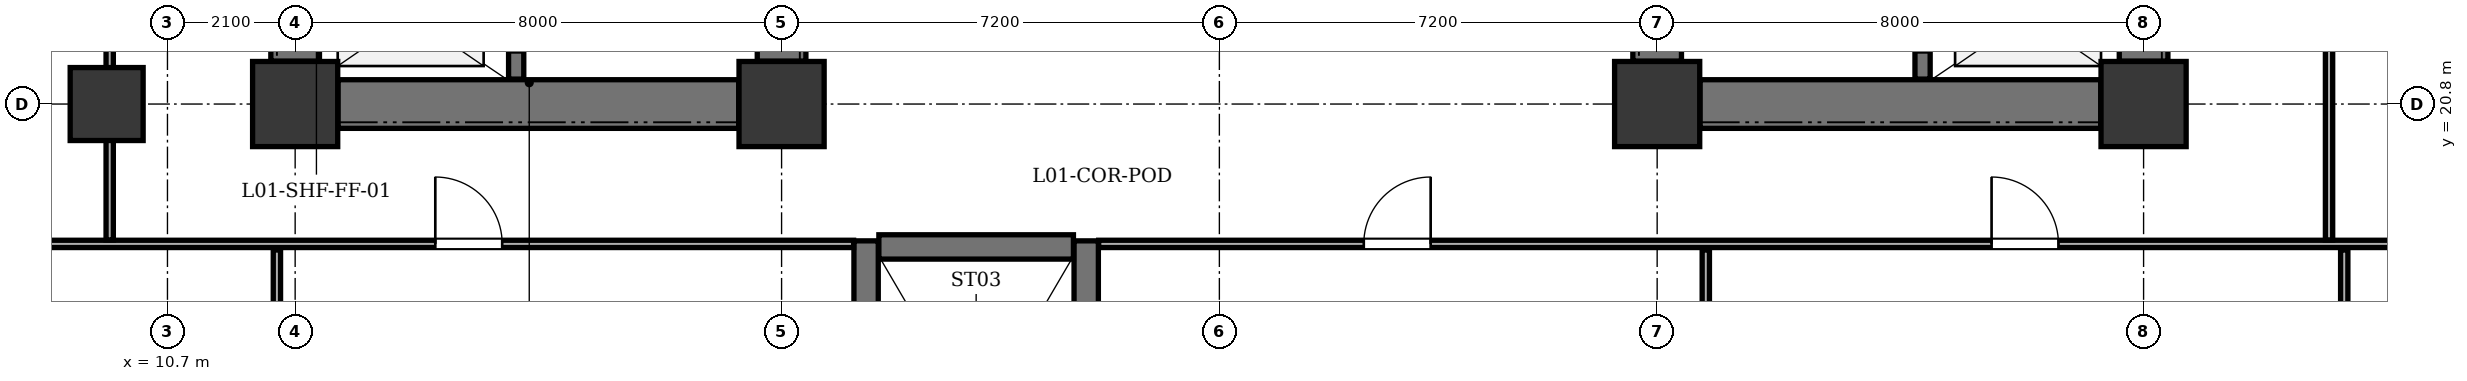
"""IFC4 building model, lengths in metres.
Left out: names, types, materials, properties, quantities, classifications, styles, units other than length and angle.
Written with IfcOpenShell. Run it as: python <this file> out.ifc"""

import sys

from ifc_helpers import new_model, si_unit, direction, frame, frame_2d, origin, origin_2d, place, context, subcontext, project, spatial, rectangle, extrude, element, fill, save


model = new_model("IFC4")
c1 = context("Model", 3, precision=1e-05, world=origin(), true_north=direction((0.0, 1.0)))
c2 = subcontext(c1, "Body", "Model", "MODEL_VIEW")
j1 = project(units=[si_unit("LENGTHUNIT", "METRE"), si_unit("PLANEANGLEUNIT", "RADIAN")], contexts=[c1])
p1 = place(None, origin())
s1 = spatial("IfcSite", under=j1, at=p1, CompositionType="ELEMENT")
p2 = place(p1, origin())
s2 = spatial("IfcBuilding", under=s1, at=p2, CompositionType="ELEMENT")
p3 = place(p2, frame((0.0, 0.0, 5.4)))
s3 = spatial("IfcBuildingStorey", under=s2, at=p3, CompositionType="ELEMENT", Elevation=5.4)
for number, where, z_axis, x_axis in (
    (1, (12.8, 20.8, 0.0), (0.0, 0.0, 1.0), (1.0, 0.0, 0.0)),
    (2, (20.8, 20.8, 0.0), (0.0, 0.0, 1.0), (1.0, 0.0, 0.0)),
    (3, (35.2, 20.8, 0.0), (0.0, 0.0, 1.0), (1.0, 0.0, 0.0)),
    (4, (43.2, 20.8, 0.0), (0.0, 0.0, 1.0), (1.0, 0.0, 0.0)),
):
    element("IfcColumn", number, at=place(p3, frame(where, z_axis=z_axis, x_axis=x_axis)), inside=s3, PredefinedType="COLUMN", context=c2, shape_type="SweptSolid", body=[
        extrude(rectangle(XDim=1.4, YDim=1.4, at=origin_2d()), origin(), (0.0, 0.0, 1.0), 4.5),
    ])
p4 = place(p3, frame((9.7, 20.8, 0.0), z_axis=(0.0, 0.0, 1.0), x_axis=(1.0, 0.0, 0.0)))
e5 = element("IfcColumn", 5, at=p4, inside=s3, PredefinedType="COLUMN", context=c2, shape_type="SweptSolid", body=[
    extrude(rectangle(XDim=1.2, YDim=1.2, at=origin_2d()), origin(), (0.0, 0.0, 1.0), 4.5),
])
p5 = place(p3, frame((12.8, 21.505, 0.0), z_axis=(0.0, 0.0, 1.0), x_axis=(0.0, 1.0, 0.0)))
e6 = element("IfcWall", 6, at=p5, inside=s3, PredefinedType="SHEAR", context=c2, shape_type="SweptSolid", body=[
    extrude(rectangle(XDim=11.39, YDim=0.8, at=frame_2d((5.695, 0.0))), origin(), (0.0, 0.0, 1.0), 4.18),
])
p6 = place(p3, frame((13.505, 20.8, 0.0), z_axis=(0.0, 0.0, 1.0), x_axis=(1.0, 0.0, 0.0)))
e7 = element("IfcWall", 7, at=p6, inside=s3, PredefinedType="SHEAR", context=c2, shape_type="SweptSolid", body=[
    extrude(rectangle(XDim=6.59, YDim=0.8, at=frame_2d((3.295, 0.0))), origin(), (0.0, 0.0, 1.0), 4.18),
])
p7 = place(p3, frame((20.8, 21.505, 0.0), z_axis=(0.0, 0.0, 1.0), x_axis=(0.0, 1.0, 0.0)))
e8 = element("IfcWall", 8, at=p7, inside=s3, PredefinedType="SHEAR", context=c2, shape_type="SweptSolid", body=[
    extrude(rectangle(XDim=11.39, YDim=0.8, at=frame_2d((5.695, 0.0))), origin(), (0.0, 0.0, 1.0), 4.18),
])
p8 = place(p7, frame((1.095, 0.0, 0.0)))
e9 = element("IfcOpeningElement", 9, at=p8, cuts=e8, PredefinedType="OPENING", context=c2, shape_type="SweptSolid", body=[
    extrude(rectangle(XDim=1.2, YDim=2.15, at=frame_2d((0.6, 1.075))), frame((0.0, 0.41, 0.0), z_axis=(0.0, -1.0, 0.0), x_axis=(1.0, 0.0, 0.0)), (0.0, 0.0, 1.0), 0.82),
])
p9 = place(p7, frame((4.095, 0.0, 0.0)))
e10 = element("IfcOpeningElement", 10, at=p9, cuts=e8, PredefinedType="OPENING", context=c2, shape_type="SweptSolid", body=[
    extrude(rectangle(XDim=1.1, YDim=2.1, at=frame_2d((0.55, 1.05))), frame((0.0, 0.41, 0.0), z_axis=(0.0, -1.0, 0.0), x_axis=(1.0, 0.0, 0.0)), (0.0, 0.0, 1.0), 0.82),
])
p10 = place(p7, frame((6.045, 0.0, 0.0)))
e11 = element("IfcOpeningElement", 11, at=p10, cuts=e8, PredefinedType="OPENING", context=c2, shape_type="SweptSolid", body=[
    extrude(rectangle(XDim=1.1, YDim=2.1, at=frame_2d((0.55, 1.05))), frame((0.0, 0.41, 0.0), z_axis=(0.0, -1.0, 0.0), x_axis=(1.0, 0.0, 0.0)), (0.0, 0.0, 1.0), 0.82),
])
p11 = place(p7, frame((7.995, 0.0, 0.0)))
e12 = element("IfcOpeningElement", 12, at=p11, cuts=e8, PredefinedType="OPENING", context=c2, shape_type="SweptSolid", body=[
    extrude(rectangle(XDim=1.1, YDim=2.1, at=frame_2d((0.55, 1.05))), frame((0.0, 0.41, 0.0), z_axis=(0.0, -1.0, 0.0), x_axis=(1.0, 0.0, 0.0)), (0.0, 0.0, 1.0), 0.82),
])
p12 = place(p7, frame((10.195, 0.0, 0.0)))
e13 = element("IfcOpeningElement", 13, at=p12, cuts=e8, PredefinedType="OPENING", context=c2, shape_type="SweptSolid", body=[
    extrude(rectangle(XDim=1.1, YDim=2.1, at=frame_2d((0.55, 1.05))), frame((0.0, 0.41, 0.0), z_axis=(0.0, -1.0, 0.0), x_axis=(1.0, 0.0, 0.0)), (0.0, 0.0, 1.0), 0.82),
])
p13 = place(p3, frame((16.435, 21.21, 0.0), z_axis=(0.0, 0.0, 1.0), x_axis=(0.0, 1.0, 0.0)))
e14 = element("IfcWall", 14, at=p13, inside=s3, PredefinedType="SHEAR", context=c2, shape_type="SweptSolid", body=[
    extrude(rectangle(XDim=11.98, YDim=0.25, at=frame_2d((5.99, 0.0))), origin(), (0.0, 0.0, 1.0), 4.18),
])
p14 = place(p13, frame((0.44, 0.0, 0.0)))
e15 = element("IfcOpeningElement", 15, at=p14, cuts=e14, PredefinedType="OPENING", context=c2, shape_type="SweptSolid", body=[
    extrude(rectangle(XDim=1.2, YDim=2.15, at=frame_2d((0.6, 1.075))), frame((0.0, 0.135, 0.0), z_axis=(0.0, -1.0, 0.0), x_axis=(1.0, 0.0, 0.0)), (0.0, 0.0, 1.0), 0.27),
])
p15 = place(p13, frame((2.59, 0.0, 0.0)))
e16 = element("IfcOpeningElement", 16, at=p15, cuts=e14, PredefinedType="OPENING", context=c2, shape_type="SweptSolid", body=[
    extrude(rectangle(XDim=1.15, YDim=2.15, at=frame_2d((0.575, 1.075))), frame((0.0, 0.135, 0.0), z_axis=(0.0, -1.0, 0.0), x_axis=(1.0, 0.0, 0.0)), (0.0, 0.0, 1.0), 0.27),
])
p16 = place(p3, frame((43.2, 21.505, 0.0), z_axis=(0.0, 0.0, 1.0), x_axis=(0.0, 1.0, 0.0)))
e17 = element("IfcWall", 17, at=p16, inside=s3, PredefinedType="SHEAR", context=c2, shape_type="SweptSolid", body=[
    extrude(rectangle(XDim=11.39, YDim=0.8, at=frame_2d((5.695, 0.0))), origin(), (0.0, 0.0, 1.0), 4.18),
])
p17 = place(p3, frame((35.905, 20.8, 0.0), z_axis=(0.0, 0.0, 1.0), x_axis=(1.0, 0.0, 0.0)))
e18 = element("IfcWall", 18, at=p17, inside=s3, PredefinedType="SHEAR", context=c2, shape_type="SweptSolid", body=[
    extrude(rectangle(XDim=6.59, YDim=0.8, at=frame_2d((3.295, 0.0))), origin(), (0.0, 0.0, 1.0), 4.18),
])
p18 = place(p3, frame((35.2, 21.505, 0.0), z_axis=(0.0, 0.0, 1.0), x_axis=(0.0, 1.0, 0.0)))
e19 = element("IfcWall", 19, at=p18, inside=s3, PredefinedType="SHEAR", context=c2, shape_type="SweptSolid", body=[
    extrude(rectangle(XDim=11.39, YDim=0.8, at=frame_2d((5.695, 0.0))), origin(), (0.0, 0.0, 1.0), 4.18),
])
p19 = place(p18, frame((1.095, 0.0, 0.0)))
e20 = element("IfcOpeningElement", 20, at=p19, cuts=e19, PredefinedType="OPENING", context=c2, shape_type="SweptSolid", body=[
    extrude(rectangle(XDim=1.2, YDim=2.15, at=frame_2d((0.6, 1.075))), frame((0.0, 0.41, 0.0), z_axis=(0.0, -1.0, 0.0), x_axis=(1.0, 0.0, 0.0)), (0.0, 0.0, 1.0), 0.82),
])
p20 = place(p18, frame((10.195, 0.0, 0.0)))
e21 = element("IfcOpeningElement", 21, at=p20, cuts=e19, PredefinedType="OPENING", context=c2, shape_type="SweptSolid", body=[
    extrude(rectangle(XDim=1.1, YDim=2.1, at=frame_2d((0.55, 1.05))), frame((0.0, 0.41, 0.0), z_axis=(0.0, -1.0, 0.0), x_axis=(1.0, 0.0, 0.0)), (0.0, 0.0, 1.0), 0.82),
])
p21 = place(p3, frame((39.565, 21.21, 0.0), z_axis=(0.0, 0.0, 1.0), x_axis=(0.0, 1.0, 0.0)))
e22 = element("IfcWall", 22, at=p21, inside=s3, PredefinedType="SHEAR", context=c2, shape_type="SweptSolid", body=[
    extrude(rectangle(XDim=11.98, YDim=0.25, at=frame_2d((5.99, 0.0))), origin(), (0.0, 0.0, 1.0), 4.18),
])
p22 = place(p21, frame((0.44, 0.0, 0.0)))
e23 = element("IfcOpeningElement", 23, at=p22, cuts=e22, PredefinedType="OPENING", context=c2, shape_type="SweptSolid", body=[
    extrude(rectangle(XDim=1.2, YDim=2.15, at=frame_2d((0.6, 1.075))), frame((0.0, 0.135, 0.0), z_axis=(0.0, -1.0, 0.0), x_axis=(1.0, 0.0, 0.0)), (0.0, 0.0, 1.0), 0.27),
])
p23 = place(p21, frame((2.59, 0.0, 0.0)))
e24 = element("IfcOpeningElement", 24, at=p23, cuts=e22, PredefinedType="OPENING", context=c2, shape_type="SweptSolid", body=[
    extrude(rectangle(XDim=1.15, YDim=2.15, at=frame_2d((0.575, 1.075))), frame((0.0, 0.135, 0.0), z_axis=(0.0, -1.0, 0.0), x_axis=(1.0, 0.0, 0.0)), (0.0, 0.0, 1.0), 0.27),
])
p24 = place(p3, frame((22.19, 10.95, 0.0), z_axis=(0.0, 0.0, 1.0), x_axis=(0.0, 1.0, 0.0)))
e25 = element("IfcWall", 25, at=p24, inside=s3, PredefinedType="SHEAR", context=c2, shape_type="SweptSolid", body=[
    extrude(rectangle(XDim=7.6, YDim=0.4, at=frame_2d((3.8, 0.0))), origin(), (0.0, 0.0, 1.0), 4.18),
])
p25 = place(p24, frame((0.35, 0.0, 0.0)))
e26 = element("IfcOpeningElement", 26, at=p25, cuts=e25, PredefinedType="OPENING", context=c2, shape_type="SweptSolid", body=[
    extrude(rectangle(XDim=1.15, YDim=2.15, at=frame_2d((0.575, 1.075))), frame((0.0, 0.21, 0.0), z_axis=(0.0, -1.0, 0.0), x_axis=(1.0, 0.0, 0.0)), (0.0, 0.0, 1.0), 0.42),
])
p26 = place(p3, frame((25.81, 10.95, 0.0), z_axis=(0.0, 0.0, 1.0), x_axis=(0.0, 1.0, 0.0)))
e27 = element("IfcWall", 27, at=p26, inside=s3, PredefinedType="SHEAR", context=c2, shape_type="SweptSolid", body=[
    extrude(rectangle(XDim=7.6, YDim=0.4, at=frame_2d((3.8, 0.0))), origin(), (0.0, 0.0, 1.0), 4.18),
])
p27 = place(p3, frame((22.4, 18.45, 0.0), z_axis=(0.0, 0.0, 1.0), x_axis=(1.0, 0.0, 0.0)))
e28 = element("IfcWall", 28, at=p27, inside=s3, PredefinedType="SHEAR", context=c2, shape_type="SweptSolid", body=[
    extrude(rectangle(XDim=3.2, YDim=0.4, at=frame_2d((1.6, 0.0))), origin(), (0.0, 0.0, 1.0), 4.18),
])
p28 = place(p3, frame((2.805, 18.5, 0.0), z_axis=(0.0, 0.0, 1.0), x_axis=(1.0, 0.0, 0.0)))
e29 = element("IfcWall", 29, at=p28, inside=s3, PredefinedType="PARTITIONING", context=c2, shape_type="SweptSolid", body=[
    extrude(rectangle(XDim=19.18, YDim=0.12, at=frame_2d((9.59, 0.0))), origin(), (0.0, 0.0, 1.0), 3.665),
])
p29 = place(p28, frame((4.0, 0.0, 0.0)))
e30 = element("IfcOpeningElement", 30, at=p29, cuts=e29, PredefinedType="OPENING", context=c2, shape_type="SweptSolid", body=[
    extrude(rectangle(XDim=1.1, YDim=2.15, at=frame_2d((0.55, 1.075))), frame((0.0, 0.07, 0.0), z_axis=(0.0, -1.0, 0.0), x_axis=(1.0, 0.0, 0.0)), (0.0, 0.0, 1.0), 0.14),
])
p30 = place(p28, frame((12.3, 0.0, 0.0)))
e31 = element("IfcOpeningElement", 31, at=p30, cuts=e29, PredefinedType="OPENING", context=c2, shape_type="SweptSolid", body=[
    extrude(rectangle(XDim=1.1, YDim=2.15, at=frame_2d((0.55, 1.075))), frame((0.0, 0.07, 0.0), z_axis=(0.0, -1.0, 0.0), x_axis=(1.0, 0.0, 0.0)), (0.0, 0.0, 1.0), 0.14),
])
p31 = place(p3, frame((26.015, 18.5, 0.0), z_axis=(0.0, 0.0, 1.0), x_axis=(1.0, 0.0, 0.0)))
e32 = element("IfcWall", 32, at=p31, inside=s3, PredefinedType="PARTITIONING", context=c2, shape_type="SweptSolid", body=[
    extrude(rectangle(XDim=31.58, YDim=0.12, at=frame_2d((15.79, 0.0))), origin(), (0.0, 0.0, 1.0), 3.665),
])
p32 = place(p31, frame((4.36, 0.0, 0.0)))
e33 = element("IfcOpeningElement", 33, at=p32, cuts=e32, PredefinedType="OPENING", context=c2, shape_type="SweptSolid", body=[
    extrude(rectangle(XDim=1.1, YDim=2.15, at=frame_2d((0.55, 1.075))), frame((0.0, 0.07, 0.0), z_axis=(0.0, -1.0, 0.0), x_axis=(1.0, 0.0, 0.0)), (0.0, 0.0, 1.0), 0.14),
])
p33 = place(p31, frame((14.685, 0.0, 0.0)))
e34 = element("IfcOpeningElement", 34, at=p33, cuts=e32, PredefinedType="OPENING", context=c2, shape_type="SweptSolid", body=[
    extrude(rectangle(XDim=1.1, YDim=2.15, at=frame_2d((0.55, 1.075))), frame((0.0, 0.07, 0.0), z_axis=(0.0, -1.0, 0.0), x_axis=(1.0, 0.0, 0.0)), (0.0, 0.0, 1.0), 0.14),
])
p34 = place(p31, frame((25.185, 0.0, 0.0)))
e35 = element("IfcOpeningElement", 35, at=p34, cuts=e32, PredefinedType="OPENING", context=c2, shape_type="SweptSolid", body=[
    extrude(rectangle(XDim=1.1, YDim=2.15, at=frame_2d((0.55, 1.075))), frame((0.0, 0.07, 0.0), z_axis=(0.0, -1.0, 0.0), x_axis=(1.0, 0.0, 0.0)), (0.0, 0.0, 1.0), 0.14),
])
p35 = place(p3, frame((12.5, 1.905, 0.0), z_axis=(0.0, 0.0, 1.0), x_axis=(0.0, 1.0, 0.0)))
e36 = element("IfcWall", 36, at=p35, inside=s3, PredefinedType="PARTITIONING", context=c2, shape_type="SweptSolid", body=[
    extrude(rectangle(XDim=16.495, YDim=0.12, at=frame_2d((8.248, 0.0))), origin(), (0.0, 0.0, 1.0), 3.065),
])
for number, where, z_axis, x_axis in (
    (37, (36.0, 1.905, 0.0), (0.0, 0.0, 1.0), (0.0, 1.0, 0.0)),
    (38, (46.5, 1.905, 0.0), (0.0, 0.0, 1.0), (0.0, 1.0, 0.0)),
):
    element("IfcWall", number, at=place(p3, frame(where, z_axis=z_axis, x_axis=x_axis)), inside=s3, PredefinedType="PARTITIONING", context=c2, shape_type="SweptSolid", body=[
        extrude(rectangle(XDim=16.495, YDim=0.12, at=frame_2d((8.248, 0.0))), origin(), (0.0, 0.0, 1.0), 4.18),
    ])
p36 = place(p3, frame((9.75, 18.565, 0.0), z_axis=(0.0, 0.0, 1.0), x_axis=(0.0, 1.0, 0.0)))
e39 = element("IfcWall", 39, at=p36, inside=s3, PredefinedType="PARTITIONING", context=c2, shape_type="SweptSolid", body=[
    extrude(rectangle(XDim=19.72, YDim=0.12, at=frame_2d((9.86, 0.0))), origin(), (0.0, 0.0, 1.0), 3.065),
])
p37 = place(p36, frame((7.985, 0.0, 0.0)))
e40 = element("IfcOpeningElement", 40, at=p37, cuts=e39, PredefinedType="OPENING", context=c2, shape_type="SweptSolid", body=[
    extrude(rectangle(XDim=1.0, YDim=2.1, at=frame_2d((0.5, 1.05))), frame((0.0, 0.07, 0.0), z_axis=(0.0, -1.0, 0.0), x_axis=(1.0, 0.0, 0.0)), (0.0, 0.0, 1.0), 0.14),
])
p38 = place(p3, frame((46.25, 18.565, 0.0), z_axis=(0.0, 0.0, 1.0), x_axis=(0.0, 1.0, 0.0)))
e41 = element("IfcWall", 41, at=p38, inside=s3, PredefinedType="PARTITIONING", context=c2, shape_type="SweptSolid", body=[
    extrude(rectangle(XDim=19.72, YDim=0.12, at=frame_2d((9.86, 0.0))), origin(), (0.0, 0.0, 1.0), 4.18),
])
p39 = place(p38, frame((7.985, 0.0, 0.0)))
e42 = element("IfcOpeningElement", 42, at=p39, cuts=e41, PredefinedType="OPENING", context=c2, shape_type="SweptSolid", body=[
    extrude(rectangle(XDim=1.0, YDim=2.1, at=frame_2d((0.5, 1.05))), frame((0.0, 0.07, 0.0), z_axis=(0.0, -1.0, 0.0), x_axis=(1.0, 0.0, 0.0)), (0.0, 0.0, 1.0), 0.14),
])
p40 = place(p30, origin())
e43 = element("IfcDoor", 43, at=p40, inside=s3, OperationType="SINGLE_SWING_LEFT", PredefinedType="DOOR", context=c2, shape_type="SweptSolid", body=[
    extrude(rectangle(XDim=1.1, YDim=2.15, at=frame_2d((0.55, 1.075))), frame((0.0, 0.025, 0.0), z_axis=(0.0, -1.0, 0.0), x_axis=(1.0, 0.0, 0.0)), (0.0, 0.0, 1.0), 0.05),
])
fill(e31, e43)
p41 = place(p32, origin())
e44 = element("IfcDoor", 44, at=p41, inside=s3, OperationType="SINGLE_SWING_RIGHT", PredefinedType="DOOR", context=c2, shape_type="SweptSolid", body=[
    extrude(rectangle(XDim=1.1, YDim=2.15, at=frame_2d((0.55, 1.075))), frame((0.0, 0.025, 0.0), z_axis=(0.0, -1.0, 0.0), x_axis=(1.0, 0.0, 0.0)), (0.0, 0.0, 1.0), 0.05),
])
fill(e33, e44)
p42 = place(p33, origin())
e45 = element("IfcDoor", 45, at=p42, inside=s3, OperationType="SINGLE_SWING_LEFT", PredefinedType="DOOR", context=c2, shape_type="SweptSolid", body=[
    extrude(rectangle(XDim=1.1, YDim=2.15, at=frame_2d((0.55, 1.075))), frame((0.0, 0.025, 0.0), z_axis=(0.0, -1.0, 0.0), x_axis=(1.0, 0.0, 0.0)), (0.0, 0.0, 1.0), 0.05),
])
fill(e34, e45)
save(model, sys.argv[1])
